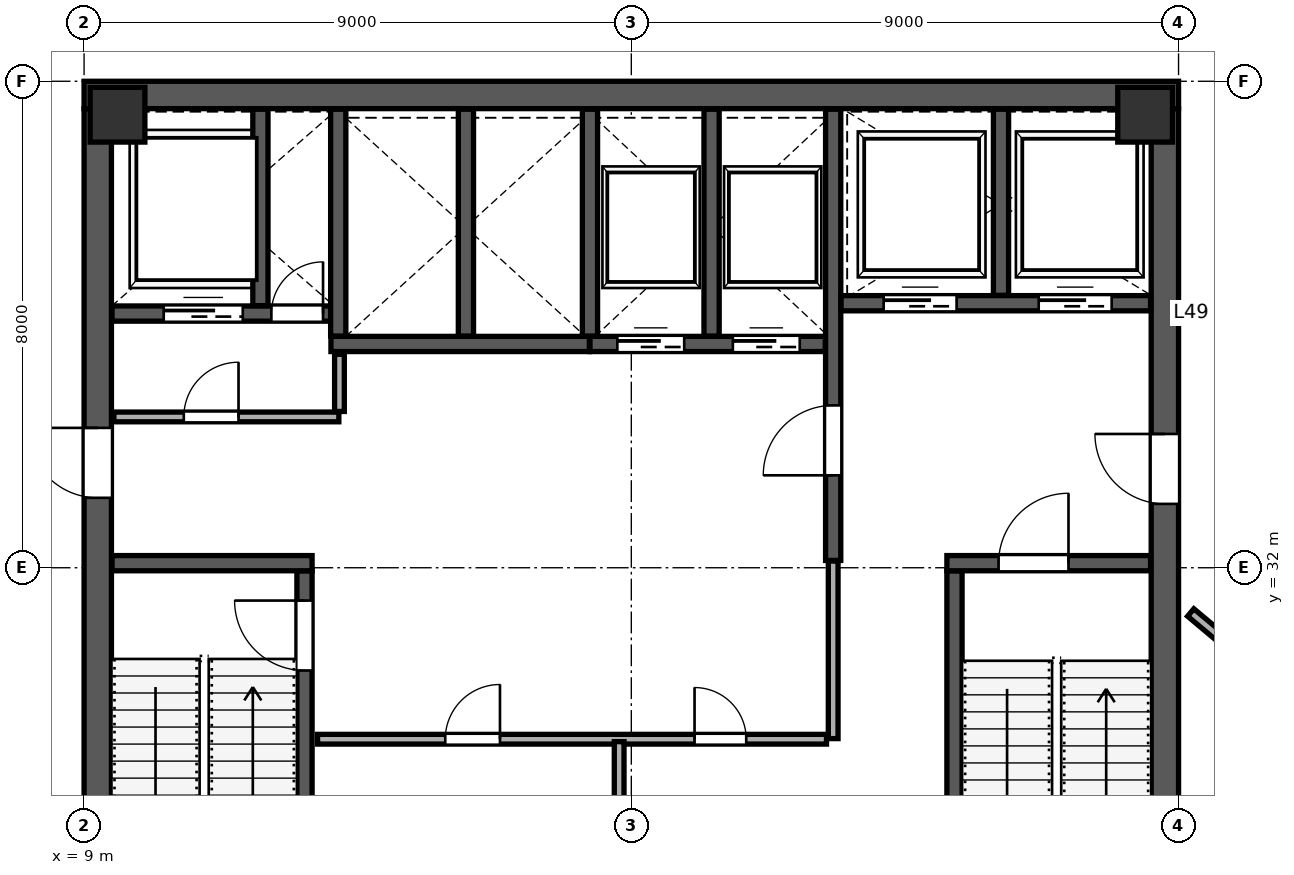
"""IFC4 building model, lengths in metres.
Left out: names, types, materials, properties, quantities, classifications, styles, units other than length and angle.
Written with IfcOpenShell. Run it as: python <this file> out.ifc"""

import sys

from ifc_helpers import new_model, si_unit, direction, frame, frame_2d, origin, origin_2d, place, context, subcontext, project, spatial, rectangle, extrude, source, transform, mapped, element, fill, save


model = new_model("IFC4")
c1 = context("Model", 3, precision=1e-05, world=origin(), true_north=direction((0.0, 1.0)))
c2 = subcontext(c1, "Body", "Model", "MODEL_VIEW")
j1 = project(units=[si_unit("LENGTHUNIT", "METRE"), si_unit("PLANEANGLEUNIT", "RADIAN")], contexts=[c1])
p1 = place(None, origin())
s1 = spatial("IfcSite", under=j1, at=p1, CompositionType="ELEMENT")
p2 = place(p1, origin())
s2 = spatial("IfcBuilding", under=s1, at=p2, CompositionType="ELEMENT")
p3 = place(p2, frame((0.0, 0.0, 220.6)))
s3 = spatial("IfcBuildingStorey", under=s2, at=p3, CompositionType="ELEMENT", Elevation=220.6)
m1 = source(origin(), c2, "Body", "SweptSolid", [
    extrude(rectangle(XDim=0.9, YDim=0.9, at=origin_2d()), origin(), (0.0, 0.0, 1.0), 4.198),
])
for number, where, z_axis, x_axis in (
    (1, (9.55, 39.45, 0.001), (0.0, 0.0, 1.0), (1.0, 0.0, 0.0)),
    (2, (26.45, 39.45, 0.001), (0.0, 0.0, 1.0), (1.0, 0.0, 0.0)),
):
    element("IfcColumn", number, at=place(p3, frame(where, z_axis=z_axis, x_axis=x_axis)), inside=s3, PredefinedType="COLUMN", context=c2, shape_type="MappedRepresentation", body=[
        mapped(m1, transform((0.0, 0.0, 0.0), scale=1.0)),
    ])
p4 = place(p3, frame((9.225, 24.45, 0.0), z_axis=(0.0, 0.0, 1.0), x_axis=(0.0, 1.0, 0.0)))
e3 = element("IfcWall", 3, at=p4, inside=s3, PredefinedType="SHEAR", context=c2, shape_type="SweptSolid", body=[
    extrude(rectangle(XDim=15.1, YDim=0.45, at=frame_2d((7.55, 0.0))), origin(), (0.0, 0.0, 1.0), 3.96),
])
p5 = place(p4, frame((8.7, 0.0, 0.0)))
e4 = element("IfcOpeningElement", 4, at=p5, cuts=e3, PredefinedType="OPENING", context=c2, shape_type="SweptSolid", body=[
    extrude(rectangle(XDim=1.15, YDim=2.2, at=frame_2d((0.575, 1.1))), frame((0.0, 0.235, 0.0), z_axis=(0.0, -1.0, 0.0), x_axis=(1.0, 0.0, 0.0)), (0.0, 0.0, 1.0), 0.47),
])
p6 = place(p3, frame((26.775, 24.45, 0.0), z_axis=(0.0, 0.0, 1.0), x_axis=(0.0, 1.0, 0.0)))
e5 = element("IfcWall", 5, at=p6, inside=s3, PredefinedType="SHEAR", context=c2, shape_type="SweptSolid", body=[
    extrude(rectangle(XDim=15.1, YDim=0.45, at=frame_2d((7.55, 0.0))), origin(), (0.0, 0.0, 1.0), 3.96),
])
p7 = place(p6, frame((8.6, 0.0, 0.0)))
e6 = element("IfcOpeningElement", 6, at=p7, cuts=e5, PredefinedType="OPENING", context=c2, shape_type="SweptSolid", body=[
    extrude(rectangle(XDim=1.15, YDim=2.2, at=frame_2d((0.575, 1.1))), frame((0.0, 0.235, 0.0), z_axis=(0.0, -1.0, 0.0), x_axis=(1.0, 0.0, 0.0)), (0.0, 0.0, 1.0), 0.47),
])
p8 = place(p3, frame((9.0, 39.775, 0.0), z_axis=(0.0, 0.0, 1.0), x_axis=(1.0, 0.0, 0.0)))
e7 = element("IfcWall", 7, at=p8, inside=s3, PredefinedType="SHEAR", context=c2, shape_type="SweptSolid", body=[
    extrude(rectangle(XDim=18.0, YDim=0.45, at=frame_2d((9.0, 0.0))), origin(), (0.0, 0.0, 1.0), 3.96),
])
p9 = place(p3, frame((12.625, 24.46, 0.0), z_axis=(0.0, 0.0, 1.0), x_axis=(0.0, 1.0, 0.0)))
e8 = element("IfcWall", 8, at=p9, inside=s3, PredefinedType="SHEAR", context=c2, shape_type="SweptSolid", body=[
    extrude(rectangle(XDim=7.49, YDim=0.25, at=frame_2d((3.745, 0.0))), origin(), (0.0, 0.0, 1.0), 3.96),
])
p10 = place(p9, frame((5.85, 0.0, 0.0)))
e9 = element("IfcOpeningElement", 9, at=p10, cuts=e8, PredefinedType="OPENING", context=c2, shape_type="SweptSolid", body=[
    extrude(rectangle(XDim=1.15, YDim=2.2, at=frame_2d((0.575, 1.1))), frame((0.0, 0.135, 0.0), z_axis=(0.0, -1.0, 0.0), x_axis=(1.0, 0.0, 0.0)), (0.0, 0.0, 1.0), 0.27),
])
p11 = place(p3, frame((9.46, 32.075, 0.0), z_axis=(0.0, 0.0, 1.0), x_axis=(1.0, 0.0, 0.0)))
e10 = element("IfcWall", 10, at=p11, inside=s3, PredefinedType="SHEAR", context=c2, shape_type="SweptSolid", body=[
    extrude(rectangle(XDim=3.29, YDim=0.25, at=frame_2d((1.645, 0.0))), origin(), (0.0, 0.0, 1.0), 3.96),
])
p12 = place(p3, frame((23.315, 24.46, 0.0), z_axis=(0.0, 0.0, 1.0), x_axis=(0.0, 1.0, 0.0)))
e11 = element("IfcWall", 11, at=p12, inside=s3, PredefinedType="SHEAR", context=c2, shape_type="SweptSolid", body=[
    extrude(rectangle(XDim=7.49, YDim=0.25, at=frame_2d((3.745, 0.0))), origin(), (0.0, 0.0, 1.0), 3.96),
])
p13 = place(p3, frame((23.19, 32.075, 0.0), z_axis=(0.0, 0.0, 1.0), x_axis=(1.0, 0.0, 0.0)))
e12 = element("IfcWall", 12, at=p13, inside=s3, PredefinedType="SHEAR", context=c2, shape_type="SweptSolid", body=[
    extrude(rectangle(XDim=3.35, YDim=0.25, at=frame_2d((1.675, 0.0))), origin(), (0.0, 0.0, 1.0), 3.96),
])
p14 = place(p13, frame((0.85, 0.0, 0.0)))
e13 = element("IfcOpeningElement", 13, at=p14, cuts=e12, PredefinedType="OPENING", context=c2, shape_type="SweptSolid", body=[
    extrude(rectangle(XDim=1.15, YDim=2.2, at=frame_2d((0.575, 1.1))), frame((0.0, 0.135, 0.0), z_axis=(0.0, -1.0, 0.0), x_axis=(1.0, 0.0, 0.0)), (0.0, 0.0, 1.0), 0.27),
])
p15 = place(p3, frame((21.32, 32.12, 0.0), z_axis=(0.0, 0.0, 1.0), x_axis=(0.0, 1.0, 0.0)))
e14 = element("IfcWall", 14, at=p15, inside=s3, PredefinedType="SHEAR", context=c2, shape_type="SweptSolid", body=[
    extrude(rectangle(XDim=7.42, YDim=0.25, at=frame_2d((3.71, 0.0))), origin(), (0.0, 0.0, 1.0), 3.96),
])
p16 = place(p15, frame((1.4, 0.0, 0.0)))
e15 = element("IfcOpeningElement", 15, at=p16, cuts=e14, PredefinedType="OPENING", context=c2, shape_type="SweptSolid", body=[
    extrude(rectangle(XDim=1.15, YDim=2.2, at=frame_2d((0.575, 1.1))), frame((0.0, 0.135, 0.0), z_axis=(0.0, -1.0, 0.0), x_axis=(1.0, 0.0, 0.0)), (0.0, 0.0, 1.0), 0.27),
])
p17 = place(p3, frame((9.46, 36.18, 0.0), z_axis=(0.0, 0.0, 1.0), x_axis=(1.0, 0.0, 0.0)))
e16 = element("IfcWall", 16, at=p17, inside=s3, PredefinedType="SHEAR", context=c2, shape_type="SweptSolid", body=[
    extrude(rectangle(XDim=3.79, YDim=0.25, at=frame_2d((1.895, 0.0))), origin(), (0.0, 0.0, 1.0), 3.96),
])
p18 = place(p17, frame((2.62, 0.0, 0.0)))
e17 = element("IfcOpeningElement", 17, at=p18, cuts=e16, PredefinedType="OPENING", context=c2, shape_type="SweptSolid", body=[
    extrude(rectangle(XDim=0.85, YDim=2.1, at=frame_2d((0.425, 1.05))), frame((0.0, 0.135, 0.0), z_axis=(0.0, -1.0, 0.0), x_axis=(1.0, 0.0, 0.0)), (0.0, 0.0, 1.0), 0.27),
])
p19 = place(p17, frame((0.85, 0.0, 0.0)))
e18 = element("IfcOpeningElement", 18, at=p19, cuts=e16, PredefinedType="OPENING", context=c2, shape_type="SweptSolid", body=[
    extrude(rectangle(XDim=1.3, YDim=2.25, at=frame_2d((0.65, 1.125))), frame((0.0, 0.135, 0.0), z_axis=(0.0, -1.0, 0.0), x_axis=(1.0, 0.0, 0.0)), (0.0, 0.0, 1.0), 0.27),
])
p20 = place(p3, frame((11.9, 36.31, 0.0), z_axis=(0.0, 0.0, 1.0), x_axis=(0.0, 1.0, 0.0)))
e19 = element("IfcWall", 19, at=p20, inside=s3, PredefinedType="SHEAR", context=c2, shape_type="SweptSolid", body=[
    extrude(rectangle(XDim=3.23, YDim=0.25, at=frame_2d((1.615, 0.0))), origin(), (0.0, 0.0, 1.0), 3.96),
])
p21 = place(p3, frame((21.45, 36.35, 0.0), z_axis=(0.0, 0.0, 1.0), x_axis=(1.0, 0.0, 0.0)))
e20 = element("IfcWall", 20, at=p21, inside=s3, PredefinedType="SHEAR", context=c2, shape_type="SweptSolid", body=[
    extrude(rectangle(XDim=5.09, YDim=0.25, at=frame_2d((2.545, 0.0))), origin(), (0.0, 0.0, 1.0), 3.96),
])
p22 = place(p21, frame((0.7, 0.0, 0.0)))
e21 = element("IfcOpeningElement", 21, at=p22, cuts=e20, PredefinedType="OPENING", context=c2, shape_type="SweptSolid", body=[
    extrude(rectangle(XDim=1.2, YDim=2.2, at=frame_2d((0.6, 1.1))), frame((0.0, 0.135, 0.0), z_axis=(0.0, -1.0, 0.0), x_axis=(1.0, 0.0, 0.0)), (0.0, 0.0, 1.0), 0.27),
])
p23 = place(p21, frame((3.25, 0.0, 0.0)))
e22 = element("IfcOpeningElement", 22, at=p23, cuts=e20, PredefinedType="OPENING", context=c2, shape_type="SweptSolid", body=[
    extrude(rectangle(XDim=1.2, YDim=2.2, at=frame_2d((0.6, 1.1))), frame((0.0, 0.135, 0.0), z_axis=(0.0, -1.0, 0.0), x_axis=(1.0, 0.0, 0.0)), (0.0, 0.0, 1.0), 0.27),
])
p24 = place(p3, frame((24.08, 36.48, 0.0), z_axis=(0.0, 0.0, 1.0), x_axis=(0.0, 1.0, 0.0)))
e23 = element("IfcWall", 23, at=p24, inside=s3, PredefinedType="SHEAR", context=c2, shape_type="SweptSolid", body=[
    extrude(rectangle(XDim=3.06, YDim=0.25, at=frame_2d((1.53, 0.0))), origin(), (0.0, 0.0, 1.0), 3.96),
])
p25 = place(p3, frame((13.06, 35.68, 0.0), z_axis=(0.0, 0.0, 1.0), x_axis=(1.0, 0.0, 0.0)))
e24 = element("IfcWall", 24, at=p25, inside=s3, PredefinedType="SHEAR", context=c2, shape_type="SweptSolid", body=[
    extrude(rectangle(XDim=4.25, YDim=0.25, at=frame_2d((2.125, 0.0))), origin(), (0.0, 0.0, 1.0), 3.96),
])
for number, where, z_axis, x_axis in (
    (25, (13.18, 35.81, 0.0), (0.0, 0.0, 1.0), (0.0, 1.0, 0.0)),
    (26, (15.28, 35.81, 0.0), (0.0, 0.0, 1.0), (0.0, 1.0, 0.0)),
):
    element("IfcWall", number, at=place(p3, frame(where, z_axis=z_axis, x_axis=x_axis)), inside=s3, PredefinedType="SHEAR", context=c2, shape_type="SweptSolid", body=[
        extrude(rectangle(XDim=3.73, YDim=0.25, at=frame_2d((1.865, 0.0))), origin(), (0.0, 0.0, 1.0), 3.96),
    ])
p26 = place(p3, frame((17.32, 35.68, 0.0), z_axis=(0.0, 0.0, 1.0), x_axis=(1.0, 0.0, 0.0)))
e27 = element("IfcWall", 27, at=p26, inside=s3, PredefinedType="SHEAR", context=c2, shape_type="SweptSolid", body=[
    extrude(rectangle(XDim=3.87, YDim=0.25, at=frame_2d((1.935, 0.0))), origin(), (0.0, 0.0, 1.0), 3.96),
])
p27 = place(p26, frame((0.45, 0.0, 0.0)))
e28 = element("IfcOpeningElement", 28, at=p27, cuts=e27, PredefinedType="OPENING", context=c2, shape_type="SweptSolid", body=[
    extrude(rectangle(XDim=1.1, YDim=2.2, at=frame_2d((0.55, 1.1))), frame((0.0, 0.135, 0.0), z_axis=(0.0, -1.0, 0.0), x_axis=(1.0, 0.0, 0.0)), (0.0, 0.0, 1.0), 0.27),
])
p28 = place(p26, frame((2.35, 0.0, 0.0)))
e29 = element("IfcOpeningElement", 29, at=p28, cuts=e27, PredefinedType="OPENING", context=c2, shape_type="SweptSolid", body=[
    extrude(rectangle(XDim=1.1, YDim=2.2, at=frame_2d((0.55, 1.1))), frame((0.0, 0.135, 0.0), z_axis=(0.0, -1.0, 0.0), x_axis=(1.0, 0.0, 0.0)), (0.0, 0.0, 1.0), 0.27),
])
for number, where, z_axis, x_axis in (
    (30, (17.32, 35.81, 0.0), (0.0, 0.0, 1.0), (0.0, 1.0, 0.0)),
    (31, (19.32, 35.81, 0.0), (0.0, 0.0, 1.0), (0.0, 1.0, 0.0)),
):
    element("IfcWall", number, at=place(p3, frame(where, z_axis=z_axis, x_axis=x_axis)), inside=s3, PredefinedType="SHEAR", context=c2, shape_type="SweptSolid", body=[
        extrude(rectangle(XDim=3.73, YDim=0.25, at=frame_2d((1.865, 0.0))), origin(), (0.0, 0.0, 1.0), 3.96),
    ])
p29 = place(p3, frame((9.49, 34.48, 0.0), z_axis=(0.0, 0.0, 1.0), x_axis=(1.0, 0.0, 0.0)))
e32 = element("IfcWall", 32, at=p29, inside=s3, PredefinedType="PARTITIONING", context=c2, shape_type="SweptSolid", body=[
    extrude(rectangle(XDim=3.7, YDim=0.16, at=frame_2d((1.85, 0.0))), origin(), (0.0, 0.0, 1.0), 3.96),
])
p30 = place(p29, frame((1.15, 0.0, 0.0)))
e33 = element("IfcOpeningElement", 33, at=p30, cuts=e32, PredefinedType="OPENING", context=c2, shape_type="SweptSolid", body=[
    extrude(rectangle(XDim=0.9, YDim=2.15, at=frame_2d((0.45, 1.075))), frame((0.0, 0.09, 0.0), z_axis=(0.0, -1.0, 0.0), x_axis=(1.0, 0.0, 0.0)), (0.0, 0.0, 1.0), 0.18),
])
p31 = place(p3, frame((13.2, 34.57, 0.0), z_axis=(0.0, 0.0, 1.0), x_axis=(0.0, 1.0, 0.0)))
e34 = element("IfcWall", 34, at=p31, inside=s3, PredefinedType="PARTITIONING", context=c2, shape_type="SweptSolid", body=[
    extrude(rectangle(XDim=0.94, YDim=0.16, at=frame_2d((0.47, 0.0))), origin(), (0.0, 0.0, 1.0), 3.96),
])
p32 = place(p3, frame((12.84, 29.18, 0.0), z_axis=(0.0, 0.0, 1.0), x_axis=(1.0, 0.0, 0.0)))
e35 = element("IfcWall", 35, at=p32, inside=s3, PredefinedType="PARTITIONING", context=c2, shape_type="SweptSolid", body=[
    extrude(rectangle(XDim=8.37, YDim=0.16, at=frame_2d((4.185, 0.0))), origin(), (0.0, 0.0, 1.0), 3.96),
])
p33 = place(p32, frame((2.1, 0.0, 0.0)))
e36 = element("IfcOpeningElement", 36, at=p33, cuts=e35, PredefinedType="OPENING", context=c2, shape_type="SweptSolid", body=[
    extrude(rectangle(XDim=0.9, YDim=2.15, at=frame_2d((0.45, 1.075))), frame((0.0, 0.09, 0.0), z_axis=(0.0, -1.0, 0.0), x_axis=(1.0, 0.0, 0.0)), (0.0, 0.0, 1.0), 0.18),
])
p34 = place(p32, frame((6.2, 0.0, 0.0)))
e37 = element("IfcOpeningElement", 37, at=p34, cuts=e35, PredefinedType="OPENING", context=c2, shape_type="SweptSolid", body=[
    extrude(rectangle(XDim=0.85, YDim=2.1, at=frame_2d((0.425, 1.05))), frame((0.0, 0.09, 0.0), z_axis=(0.0, -1.0, 0.0), x_axis=(1.0, 0.0, 0.0)), (0.0, 0.0, 1.0), 0.18),
])
p35 = place(p3, frame((17.8, 24.54, 0.0), z_axis=(0.0, 0.0, 1.0), x_axis=(0.0, 1.0, 0.0)))
e38 = element("IfcWall", 38, at=p35, inside=s3, PredefinedType="PARTITIONING", context=c2, shape_type="SweptSolid", body=[
    extrude(rectangle(XDim=4.6, YDim=0.16, at=frame_2d((2.3, 0.0))), origin(), (0.0, 0.0, 1.0), 3.96),
])
p36 = place(p3, frame((21.32, 29.19, 0.0), z_axis=(0.0, 0.0, 1.0), x_axis=(0.0, 1.0, 0.0)))
e39 = element("IfcWall", 39, at=p36, inside=s3, PredefinedType="PARTITIONING", context=c2, shape_type="SweptSolid", body=[
    extrude(rectangle(XDim=2.92, YDim=0.16, at=frame_2d((1.46, 0.0))), origin(), (0.0, 0.0, 1.0), 3.96),
])
p37 = place(p3, frame((27.2, 31.264, 0.0), z_axis=(0.0, 0.0, 1.0), x_axis=(0.766046809659, -0.642784789344, 0.0)))
e40 = element("IfcWall", 40, at=p37, inside=s3, PredefinedType="PARTITIONING", context=c2, shape_type="SweptSolid", body=[
    extrude(rectangle(XDim=1.42, YDim=0.16, at=frame_2d((0.71, 0.0))), origin(), (0.0, 0.0, 1.0), 3.96),
])
p38 = place(p3, frame((16.416, 50.848, 0.0), z_axis=(0.0, 0.0, 1.0), x_axis=(0.766043174175, -0.642789121951, 0.0)))
e41 = element("IfcWall", 41, at=p38, inside=s3, PredefinedType="PARTITIONING", context=c2, shape_type="SweptSolid", body=[
    extrude(rectangle(XDim=22.27, YDim=0.115, at=frame_2d((11.135, 0.0))), origin(), (0.0, 0.0, 1.0), 3.96),
])
p39 = place(p38, frame((1.05, 0.0, 0.0)))
e42 = element("IfcOpeningElement", 42, at=p39, cuts=e41, PredefinedType="OPENING", context=c2, shape_type="SweptSolid", body=[
    extrude(rectangle(XDim=0.95, YDim=2.15, at=frame_2d((0.475, 1.075))), frame((0.0, 0.067, 0.0), z_axis=(0.0, -1.0, 0.0), x_axis=(1.0, 0.0, 0.0)), (0.0, 0.0, 1.0), 0.135),
])
p40 = place(p38, frame((9.8, 0.0, 0.0)))
e43 = element("IfcOpeningElement", 43, at=p40, cuts=e41, PredefinedType="OPENING", context=c2, shape_type="SweptSolid", body=[
    extrude(rectangle(XDim=0.95, YDim=2.15, at=frame_2d((0.475, 1.075))), frame((0.0, 0.067, 0.0), z_axis=(0.0, -1.0, 0.0), x_axis=(1.0, 0.0, 0.0)), (0.0, 0.0, 1.0), 0.135),
])
p41 = place(p3, frame((0.894, 32.412, 0.0), z_axis=(0.0, 0.0, 1.0), x_axis=(0.642782006196, 0.766049144971, 0.0)))
e44 = element("IfcWall", 44, at=p41, inside=s3, PredefinedType="PARTITIONING", context=c2, shape_type="SweptSolid", body=[
    extrude(rectangle(XDim=28.95, YDim=0.115, at=frame_2d((14.475, 0.0))), origin(), (0.0, 0.0, 1.0), 3.96),
])
p42 = place(p41, frame((2.2, 0.0, 0.0)))
e45 = element("IfcOpeningElement", 45, at=p42, cuts=e44, PredefinedType="OPENING", context=c2, shape_type="SweptSolid", body=[
    extrude(rectangle(XDim=0.95, YDim=2.15, at=frame_2d((0.475, 1.075))), frame((0.0, 0.067, 0.0), z_axis=(0.0, -1.0, 0.0), x_axis=(1.0, 0.0, 0.0)), (0.0, 0.0, 1.0), 0.135),
])
m2 = source(origin(), c2, "Body", "SweptSolid", [
    extrude(rectangle(XDim=1.15, YDim=2.2, at=frame_2d((0.575, 1.1))), frame((0.0, 0.025, 0.0), z_axis=(0.0, -1.0, 0.0), x_axis=(1.0, 0.0, 0.0)), (0.0, 0.0, 1.0), 0.05),
])
p43 = place(p10, origin())
e46 = element("IfcDoor", 46, at=p43, inside=s3, OperationType="SINGLE_SWING_RIGHT", PredefinedType="DOOR", context=c2, shape_type="MappedRepresentation", body=[
    mapped(m2, transform((0.0, 0.0, 0.0), scale=1.0)),
])
fill(e9, e46)
m3 = source(origin(), c2, "Body", "SweptSolid", [
    extrude(rectangle(XDim=1.15, YDim=2.2, at=frame_2d((0.575, 1.1))), frame((0.0, 0.025, 0.0), z_axis=(0.0, -1.0, 0.0), x_axis=(1.0, 0.0, 0.0)), (0.0, 0.0, 1.0), 0.05),
])
p44 = place(p16, origin())
e47 = element("IfcDoor", 47, at=p44, inside=s3, OperationType="SINGLE_SWING_LEFT", PredefinedType="DOOR", context=c2, shape_type="MappedRepresentation", body=[
    mapped(m3, transform((0.0, 0.0, 0.0), scale=1.0)),
])
fill(e15, e47)
p45 = place(p14, origin())
e48 = element("IfcDoor", 48, at=p45, inside=s3, OperationType="SINGLE_SWING_RIGHT", PredefinedType="DOOR", context=c2, shape_type="MappedRepresentation", body=[
    mapped(m2, transform((0.0, 0.0, 0.0), scale=1.0)),
])
fill(e13, e48)
p46 = place(p7, origin())
e49 = element("IfcDoor", 49, at=p46, inside=s3, OperationType="SINGLE_SWING_RIGHT", PredefinedType="DOOR", context=c2, shape_type="MappedRepresentation", body=[
    mapped(m3, transform((0.0, 0.0, 0.0), scale=1.0)),
])
fill(e6, e49)
p47 = place(p5, origin())
e50 = element("IfcDoor", 50, at=p47, inside=s3, OperationType="SINGLE_SWING_RIGHT", PredefinedType="DOOR", context=c2, shape_type="MappedRepresentation", body=[
    mapped(m3, transform((0.0, 0.0, 0.0), scale=1.0)),
])
fill(e4, e50)
m4 = source(origin(), c2, "Body", "SweptSolid", [
    extrude(rectangle(XDim=0.85, YDim=2.1, at=frame_2d((0.425, 1.05))), frame((0.0, 0.025, 0.0), z_axis=(0.0, -1.0, 0.0), x_axis=(1.0, 0.0, 0.0)), (0.0, 0.0, 1.0), 0.05),
])
p48 = place(p18, origin())
e51 = element("IfcDoor", 51, at=p48, inside=s3, OperationType="SINGLE_SWING_RIGHT", PredefinedType="DOOR", context=c2, shape_type="MappedRepresentation", body=[
    mapped(m4, transform((0.0, 0.0, 0.0), scale=1.0)),
])
fill(e17, e51)
m5 = source(origin(), c2, "Body", "SweptSolid", [
    extrude(rectangle(XDim=1.1, YDim=2.2, at=frame_2d((0.55, 1.1))), frame((0.0, 0.025, 0.0), z_axis=(0.0, -1.0, 0.0), x_axis=(1.0, 0.0, 0.0)), (0.0, 0.0, 1.0), 0.05),
])
p49 = place(p27, origin())
e52 = element("IfcDoor", 52, at=p49, inside=s3, OperationType="SLIDING_TO_LEFT", PredefinedType="DOOR", context=c2, shape_type="MappedRepresentation", body=[
    mapped(m5, transform((0.0, 0.0, 0.0), scale=1.0)),
])
fill(e28, e52)
p50 = place(p28, origin())
e53 = element("IfcDoor", 53, at=p50, inside=s3, OperationType="SLIDING_TO_RIGHT", PredefinedType="DOOR", context=c2, shape_type="MappedRepresentation", body=[
    mapped(m5, transform((0.0, 0.0, 0.0), scale=1.0)),
])
fill(e29, e53)
m6 = source(origin(), c2, "Body", "SweptSolid", [
    extrude(rectangle(XDim=1.2, YDim=2.2, at=frame_2d((0.6, 1.1))), frame((0.0, 0.025, 0.0), z_axis=(0.0, -1.0, 0.0), x_axis=(1.0, 0.0, 0.0)), (0.0, 0.0, 1.0), 0.05),
])
p51 = place(p22, origin())
e54 = element("IfcDoor", 54, at=p51, inside=s3, OperationType="SLIDING_TO_LEFT", PredefinedType="DOOR", context=c2, shape_type="MappedRepresentation", body=[
    mapped(m6, transform((0.0, 0.0, 0.0), scale=1.0)),
])
fill(e21, e54)
p52 = place(p23, origin())
e55 = element("IfcDoor", 55, at=p52, inside=s3, OperationType="SLIDING_TO_RIGHT", PredefinedType="DOOR", context=c2, shape_type="MappedRepresentation", body=[
    mapped(m6, transform((0.0, 0.0, 0.0), scale=1.0)),
])
fill(e22, e55)
m7 = source(origin(), c2, "Body", "SweptSolid", [
    extrude(rectangle(XDim=1.3, YDim=2.25, at=frame_2d((0.65, 1.125))), frame((0.0, 0.025, 0.0), z_axis=(0.0, -1.0, 0.0), x_axis=(1.0, 0.0, 0.0)), (0.0, 0.0, 1.0), 0.05),
])
p53 = place(p19, origin())
e56 = element("IfcDoor", 56, at=p53, inside=s3, OperationType="SLIDING_TO_LEFT", PredefinedType="DOOR", context=c2, shape_type="MappedRepresentation", body=[
    mapped(m7, transform((0.0, 0.0, 0.0), scale=1.0)),
])
fill(e18, e56)
m8 = source(origin(), c2, "Body", "SweptSolid", [
    extrude(rectangle(XDim=0.9, YDim=2.15, at=frame_2d((0.45, 1.075))), frame((0.0, 0.025, 0.0), z_axis=(0.0, -1.0, 0.0), x_axis=(1.0, 0.0, 0.0)), (0.0, 0.0, 1.0), 0.05),
])
p54 = place(p30, origin())
e57 = element("IfcDoor", 57, at=p54, inside=s3, OperationType="SINGLE_SWING_RIGHT", PredefinedType="DOOR", context=c2, shape_type="MappedRepresentation", body=[
    mapped(m8, transform((0.0, 0.0, 0.0), scale=1.0)),
])
fill(e33, e57)
p55 = place(p33, origin())
e58 = element("IfcDoor", 58, at=p55, inside=s3, OperationType="SINGLE_SWING_RIGHT", PredefinedType="DOOR", context=c2, shape_type="MappedRepresentation", body=[
    mapped(m8, transform((0.0, 0.0, 0.0), scale=1.0)),
])
fill(e36, e58)
p56 = place(p34, origin())
e59 = element("IfcDoor", 59, at=p56, inside=s3, OperationType="SINGLE_SWING_LEFT", PredefinedType="DOOR", context=c2, shape_type="MappedRepresentation", body=[
    mapped(m4, transform((0.0, 0.0, 0.0), scale=1.0)),
])
fill(e37, e59)
save(model, sys.argv[1])
